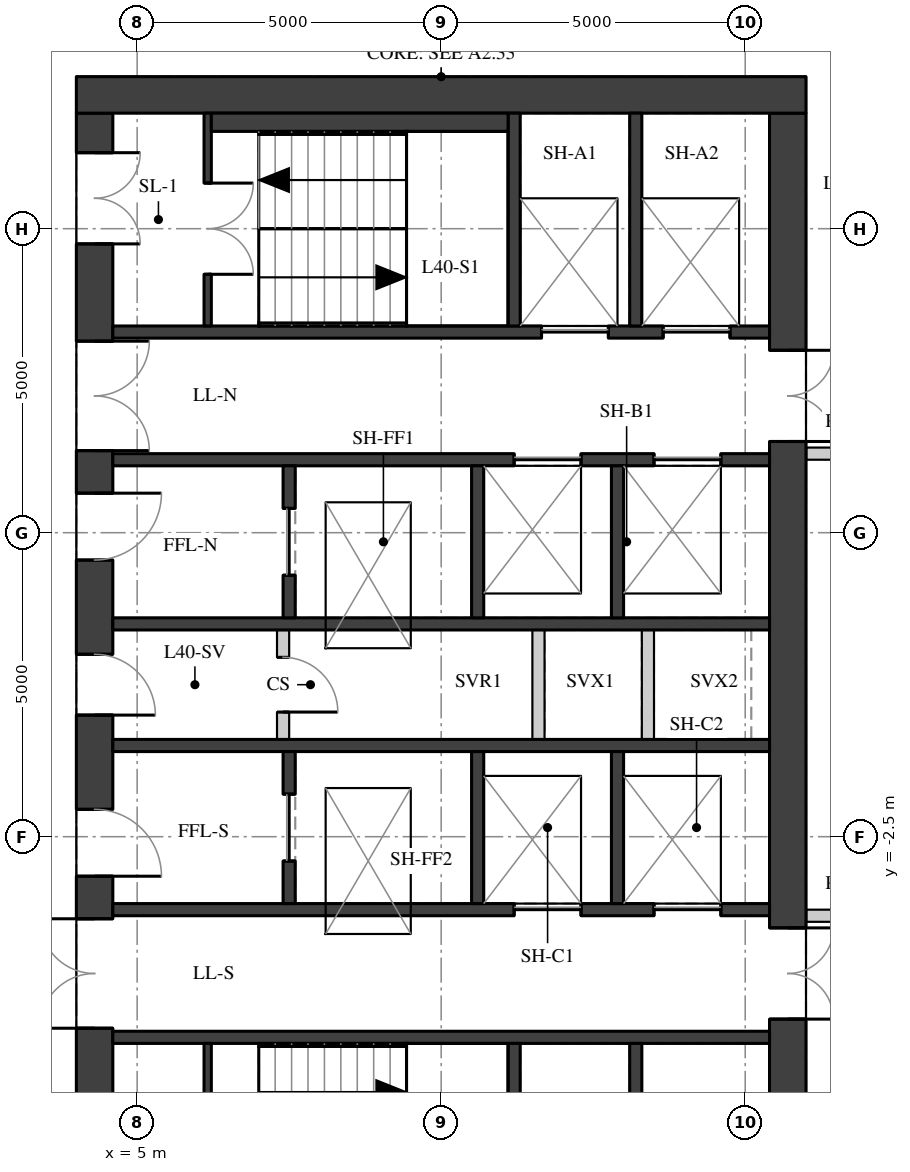
"""IFC4 building model, lengths in metres.
Left out: names, types, materials, properties, quantities, classifications, styles, units other than length and angle.
Written with IfcOpenShell. Run it as: python <this file> out.ifc"""

import sys

from ifc_helpers import new_model, si_unit, direction, frame, frame_2d, origin, place, context, subcontext, project, spatial, rectangle, extrude, element, fill, save


model = new_model("IFC4")
c1 = context("Model", 3, precision=1e-05, world=origin(), true_north=direction((0.0, 1.0)))
c2 = subcontext(c1, "Body", "Model", "MODEL_VIEW")
j1 = project(units=[si_unit("LENGTHUNIT", "METRE"), si_unit("PLANEANGLEUNIT", "RADIAN")], contexts=[c1])
p1 = place(None, origin())
s1 = spatial("IfcSite", under=j1, at=p1, CompositionType="ELEMENT")
p2 = place(p1, origin())
s2 = spatial("IfcBuilding", under=s1, at=p2, CompositionType="ELEMENT")
p3 = place(p2, frame((0.0, 0.0, 145.1)))
s3 = spatial("IfcBuildingStorey", under=s2, at=p3, CompositionType="ELEMENT", Elevation=145.1)
p4 = place(p3, frame((4.3, -9.4, 0.0), z_axis=(0.0, 0.0, 1.0), x_axis=(0.0, 1.0, 0.0)))
e1 = element("IfcWall", 1, at=p4, inside=s3, PredefinedType="SHEAR", context=c2, shape_type="SweptSolid", body=[
    extrude(rectangle(XDim=18.8, YDim=0.6, at=frame_2d((9.4, 0.0))), origin(), (0.0, 0.0, 1.0), 3.02),
])
p5 = place(p4, frame((0.65, 0.0, 0.0)))
e2 = element("IfcOpeningElement", 2, at=p5, cuts=e1, PredefinedType="OPENING", context=c2, shape_type="SweptSolid", body=[
    extrude(rectangle(XDim=1.5, YDim=2.1, at=frame_2d((0.75, 1.05))), frame((0.0, 0.31, 0.0), z_axis=(0.0, -1.0, 0.0), x_axis=(1.0, 0.0, 0.0)), (0.0, 0.0, 1.0), 0.62),
])
p6 = place(p4, frame((3.75, 0.0, 0.0)))
e3 = element("IfcOpeningElement", 3, at=p6, cuts=e1, PredefinedType="OPENING", context=c2, shape_type="SweptSolid", body=[
    extrude(rectangle(XDim=1.8, YDim=2.1, at=frame_2d((0.9, 1.05))), frame((0.0, 0.31, 0.0), z_axis=(0.0, -1.0, 0.0), x_axis=(1.0, 0.0, 0.0)), (0.0, 0.0, 1.0), 0.62),
])
p7 = place(p4, frame((6.25, 0.0, 0.0)))
e4 = element("IfcOpeningElement", 4, at=p7, cuts=e1, PredefinedType="OPENING", context=c2, shape_type="SweptSolid", body=[
    extrude(rectangle(XDim=1.1, YDim=2.1, at=frame_2d((0.55, 1.05))), frame((0.0, 0.31, 0.0), z_axis=(0.0, -1.0, 0.0), x_axis=(1.0, 0.0, 0.0)), (0.0, 0.0, 1.0), 0.62),
])
p8 = place(p4, frame((8.9, 0.0, 0.0)))
e5 = element("IfcOpeningElement", 5, at=p8, cuts=e1, PredefinedType="OPENING", context=c2, shape_type="SweptSolid", body=[
    extrude(rectangle(XDim=1.0, YDim=2.1, at=frame_2d((0.5, 1.05))), frame((0.0, 0.31, 0.0), z_axis=(0.0, -1.0, 0.0), x_axis=(1.0, 0.0, 0.0)), (0.0, 0.0, 1.0), 0.62),
])
p9 = place(p4, frame((11.45, 0.0, 0.0)))
e6 = element("IfcOpeningElement", 6, at=p9, cuts=e1, PredefinedType="OPENING", context=c2, shape_type="SweptSolid", body=[
    extrude(rectangle(XDim=1.1, YDim=2.1, at=frame_2d((0.55, 1.05))), frame((0.0, 0.31, 0.0), z_axis=(0.0, -1.0, 0.0), x_axis=(1.0, 0.0, 0.0)), (0.0, 0.0, 1.0), 0.62),
])
p10 = place(p4, frame((13.25, 0.0, 0.0)))
e7 = element("IfcOpeningElement", 7, at=p10, cuts=e1, PredefinedType="OPENING", context=c2, shape_type="SweptSolid", body=[
    extrude(rectangle(XDim=1.8, YDim=2.1, at=frame_2d((0.9, 1.05))), frame((0.0, 0.31, 0.0), z_axis=(0.0, -1.0, 0.0), x_axis=(1.0, 0.0, 0.0)), (0.0, 0.0, 1.0), 0.62),
])
p11 = place(p4, frame((16.65, 0.0, 0.0)))
e8 = element("IfcOpeningElement", 8, at=p11, cuts=e1, PredefinedType="OPENING", context=c2, shape_type="SweptSolid", body=[
    extrude(rectangle(XDim=1.5, YDim=2.1, at=frame_2d((0.75, 1.05))), frame((0.0, 0.31, 0.0), z_axis=(0.0, -1.0, 0.0), x_axis=(1.0, 0.0, 0.0)), (0.0, 0.0, 1.0), 0.62),
])
p12 = place(p3, frame((15.7, -9.4, 0.0), z_axis=(0.0, 0.0, 1.0), x_axis=(0.0, 1.0, 0.0)))
e9 = element("IfcWall", 9, at=p12, inside=s3, PredefinedType="SHEAR", context=c2, shape_type="SweptSolid", body=[
    extrude(rectangle(XDim=18.8, YDim=0.6, at=frame_2d((9.4, 0.0))), origin(), (0.0, 0.0, 1.0), 3.02),
])
p13 = place(p12, frame((13.4, 0.0, 0.0)))
e10 = element("IfcOpeningElement", 10, at=p13, cuts=e9, PredefinedType="OPENING", context=c2, shape_type="SweptSolid", body=[
    extrude(rectangle(XDim=1.5, YDim=2.1, at=frame_2d((0.75, 1.05))), frame((0.0, 0.31, 0.0), z_axis=(0.0, -1.0, 0.0), x_axis=(1.0, 0.0, 0.0)), (0.0, 0.0, 1.0), 0.62),
])
p14 = place(p12, frame((3.9, 0.0, 0.0)))
e11 = element("IfcOpeningElement", 11, at=p14, cuts=e9, PredefinedType="OPENING", context=c2, shape_type="SweptSolid", body=[
    extrude(rectangle(XDim=1.5, YDim=2.1, at=frame_2d((0.75, 1.05))), frame((0.0, 0.31, 0.0), z_axis=(0.0, -1.0, 0.0), x_axis=(1.0, 0.0, 0.0)), (0.0, 0.0, 1.0), 0.62),
])
p15 = place(p3, frame((4.0, 9.7, 0.0), z_axis=(0.0, 0.0, 1.0), x_axis=(1.0, 0.0, 0.0)))
e12 = element("IfcWall", 12, at=p15, inside=s3, PredefinedType="SHEAR", context=c2, shape_type="SweptSolid", body=[
    extrude(rectangle(XDim=12.0, YDim=0.6, at=frame_2d((6.0, 0.0))), origin(), (0.0, 0.0, 1.0), 3.02),
])
p16 = place(p3, frame((4.6, 5.8, 0.0), z_axis=(0.0, 0.0, 1.0), x_axis=(1.0, 0.0, 0.0)))
e13 = element("IfcWall", 13, at=p16, inside=s3, PredefinedType="SHEAR", context=c2, shape_type="SweptSolid", body=[
    extrude(rectangle(XDim=10.8, YDim=0.2, at=frame_2d((5.4, 0.0))), origin(), (0.0, 0.0, 1.0), 3.02),
])
p17 = place(p16, frame((7.05, 0.0, 0.0)))
e14 = element("IfcOpeningElement", 14, at=p17, cuts=e13, PredefinedType="OPENING", context=c2, shape_type="SweptSolid", body=[
    extrude(rectangle(XDim=1.1, YDim=2.1, at=frame_2d((0.55, 1.05))), frame((0.0, 0.11, 0.0), z_axis=(0.0, -1.0, 0.0), x_axis=(1.0, 0.0, 0.0)), (0.0, 0.0, 1.0), 0.22),
])
p18 = place(p16, frame((9.05, 0.0, 0.0)))
e15 = element("IfcOpeningElement", 15, at=p18, cuts=e13, PredefinedType="OPENING", context=c2, shape_type="SweptSolid", body=[
    extrude(rectangle(XDim=1.1, YDim=2.1, at=frame_2d((0.55, 1.05))), frame((0.0, 0.11, 0.0), z_axis=(0.0, -1.0, 0.0), x_axis=(1.0, 0.0, 0.0)), (0.0, 0.0, 1.0), 0.22),
])
p19 = place(p3, frame((4.6, 3.7, 0.0), z_axis=(0.0, 0.0, 1.0), x_axis=(1.0, 0.0, 0.0)))
e16 = element("IfcWall", 16, at=p19, inside=s3, PredefinedType="SHEAR", context=c2, shape_type="SweptSolid", body=[
    extrude(rectangle(XDim=10.8, YDim=0.2, at=frame_2d((5.4, 0.0))), origin(), (0.0, 0.0, 1.0), 3.02),
])
p20 = place(p19, frame((6.6, 0.0, 0.0)))
e17 = element("IfcOpeningElement", 17, at=p20, cuts=e16, PredefinedType="OPENING", context=c2, shape_type="SweptSolid", body=[
    extrude(rectangle(XDim=1.1, YDim=2.1, at=frame_2d((0.55, 1.05))), frame((0.0, 0.11, 0.0), z_axis=(0.0, -1.0, 0.0), x_axis=(1.0, 0.0, 0.0)), (0.0, 0.0, 1.0), 0.22),
])
p21 = place(p19, frame((8.9, 0.0, 0.0)))
e18 = element("IfcOpeningElement", 18, at=p21, cuts=e16, PredefinedType="OPENING", context=c2, shape_type="SweptSolid", body=[
    extrude(rectangle(XDim=1.1, YDim=2.1, at=frame_2d((0.55, 1.05))), frame((0.0, 0.11, 0.0), z_axis=(0.0, -1.0, 0.0), x_axis=(1.0, 0.0, 0.0)), (0.0, 0.0, 1.0), 0.22),
])
for number, where, z_axis, x_axis in (
    (19, (4.6, 1.0, 0.0), (0.0, 0.0, 1.0), (1.0, 0.0, 0.0)),
    (20, (4.6, -1.0, 0.0), (0.0, 0.0, 1.0), (1.0, 0.0, 0.0)),
):
    element("IfcWall", number, at=place(p3, frame(where, z_axis=z_axis, x_axis=x_axis)), inside=s3, PredefinedType="SHEAR", context=c2, shape_type="SweptSolid", body=[
        extrude(rectangle(XDim=10.8, YDim=0.2, at=frame_2d((5.4, 0.0))), origin(), (0.0, 0.0, 1.0), 3.02),
    ])
p22 = place(p3, frame((4.6, -3.7, 0.0), z_axis=(0.0, 0.0, 1.0), x_axis=(1.0, 0.0, 0.0)))
e21 = element("IfcWall", 21, at=p22, inside=s3, PredefinedType="SHEAR", context=c2, shape_type="SweptSolid", body=[
    extrude(rectangle(XDim=10.8, YDim=0.2, at=frame_2d((5.4, 0.0))), origin(), (0.0, 0.0, 1.0), 3.02),
])
p23 = place(p22, frame((6.6, 0.0, 0.0)))
e22 = element("IfcOpeningElement", 22, at=p23, cuts=e21, PredefinedType="OPENING", context=c2, shape_type="SweptSolid", body=[
    extrude(rectangle(XDim=1.1, YDim=2.1, at=frame_2d((0.55, 1.05))), frame((0.0, 0.11, 0.0), z_axis=(0.0, -1.0, 0.0), x_axis=(1.0, 0.0, 0.0)), (0.0, 0.0, 1.0), 0.22),
])
p24 = place(p22, frame((8.9, 0.0, 0.0)))
e23 = element("IfcOpeningElement", 23, at=p24, cuts=e21, PredefinedType="OPENING", context=c2, shape_type="SweptSolid", body=[
    extrude(rectangle(XDim=1.1, YDim=2.1, at=frame_2d((0.55, 1.05))), frame((0.0, 0.11, 0.0), z_axis=(0.0, -1.0, 0.0), x_axis=(1.0, 0.0, 0.0)), (0.0, 0.0, 1.0), 0.22),
])
p25 = place(p3, frame((4.6, -5.8, 0.0), z_axis=(0.0, 0.0, 1.0), x_axis=(1.0, 0.0, 0.0)))
e24 = element("IfcWall", 24, at=p25, inside=s3, PredefinedType="SHEAR", context=c2, shape_type="SweptSolid", body=[
    extrude(rectangle(XDim=10.8, YDim=0.2, at=frame_2d((5.4, 0.0))), origin(), (0.0, 0.0, 1.0), 3.02),
])
for number, where, z_axis, x_axis in (
    (25, (11.2, 5.9, 0.0), (0.0, 0.0, 1.0), (0.0, 1.0, 0.0)),
    (26, (11.2, -9.4, 0.0), (0.0, 0.0, 1.0), (0.0, 1.0, 0.0)),
    (27, (13.2, 5.9, 0.0), (0.0, 0.0, 1.0), (0.0, 1.0, 0.0)),
    (28, (13.2, -9.4, 0.0), (0.0, 0.0, 1.0), (0.0, 1.0, 0.0)),
):
    element("IfcWall", number, at=place(p3, frame(where, z_axis=z_axis, x_axis=x_axis)), inside=s3, PredefinedType="SHEAR", context=c2, shape_type="SweptSolid", body=[
        extrude(rectangle(XDim=3.5, YDim=0.2, at=frame_2d((1.75, 0.0))), origin(), (0.0, 0.0, 1.0), 3.02),
    ])
p26 = place(p3, frame((7.5, 1.1, 0.0), z_axis=(0.0, 0.0, 1.0), x_axis=(0.0, 1.0, 0.0)))
e29 = element("IfcWall", 29, at=p26, inside=s3, PredefinedType="SHEAR", context=c2, shape_type="SweptSolid", body=[
    extrude(rectangle(XDim=2.5, YDim=0.2, at=frame_2d((1.25, 0.0))), origin(), (0.0, 0.0, 1.0), 3.02),
])
p27 = place(p26, frame((0.7, 0.0, 0.0)))
e30 = element("IfcOpeningElement", 30, at=p27, cuts=e29, PredefinedType="OPENING", context=c2, shape_type="SweptSolid", body=[
    extrude(rectangle(XDim=1.1, YDim=2.1, at=frame_2d((0.55, 1.05))), frame((0.0, 0.11, 0.0), z_axis=(0.0, -1.0, 0.0), x_axis=(1.0, 0.0, 0.0)), (0.0, 0.0, 1.0), 0.22),
])
p28 = place(p3, frame((7.5, -3.6, 0.0), z_axis=(0.0, 0.0, 1.0), x_axis=(0.0, 1.0, 0.0)))
e31 = element("IfcWall", 31, at=p28, inside=s3, PredefinedType="SHEAR", context=c2, shape_type="SweptSolid", body=[
    extrude(rectangle(XDim=2.5, YDim=0.2, at=frame_2d((1.25, 0.0))), origin(), (0.0, 0.0, 1.0), 3.02),
])
p29 = place(p28, frame((0.7, 0.0, 0.0)))
e32 = element("IfcOpeningElement", 32, at=p29, cuts=e31, PredefinedType="OPENING", context=c2, shape_type="SweptSolid", body=[
    extrude(rectangle(XDim=1.1, YDim=2.1, at=frame_2d((0.55, 1.05))), frame((0.0, 0.11, 0.0), z_axis=(0.0, -1.0, 0.0), x_axis=(1.0, 0.0, 0.0)), (0.0, 0.0, 1.0), 0.22),
])
for number, where, z_axis, x_axis in (
    (33, (10.6, 1.1, 0.0), (0.0, 0.0, 1.0), (0.0, 1.0, 0.0)),
    (34, (10.6, -3.6, 0.0), (0.0, 0.0, 1.0), (0.0, 1.0, 0.0)),
    (35, (12.9, 1.1, 0.0), (0.0, 0.0, 1.0), (0.0, 1.0, 0.0)),
    (36, (12.9, -3.6, 0.0), (0.0, 0.0, 1.0), (0.0, 1.0, 0.0)),
):
    element("IfcWall", number, at=place(p3, frame(where, z_axis=z_axis, x_axis=x_axis)), inside=s3, PredefinedType="SHEAR", context=c2, shape_type="SweptSolid", body=[
        extrude(rectangle(XDim=2.5, YDim=0.2, at=frame_2d((1.25, 0.0))), origin(), (0.0, 0.0, 1.0), 3.02),
    ])
p30 = place(p3, frame((6.16, 5.9, 0.0), z_axis=(0.0, 0.0, 1.0), x_axis=(0.0, 1.0, 0.0)))
e37 = element("IfcWall", 37, at=p30, inside=s3, PredefinedType="SHEAR", context=c2, shape_type="SweptSolid", body=[
    extrude(rectangle(XDim=3.5, YDim=0.12, at=frame_2d((1.75, 0.0))), origin(), (0.0, 0.0, 1.0), 3.02),
])
p31 = place(p30, frame((0.85, 0.0, 0.0)))
e38 = element("IfcOpeningElement", 38, at=p31, cuts=e37, PredefinedType="OPENING", context=c2, shape_type="SweptSolid", body=[
    extrude(rectangle(XDim=1.5, YDim=2.1, at=frame_2d((0.75, 1.05))), frame((0.0, 0.07, 0.0), z_axis=(0.0, -1.0, 0.0), x_axis=(1.0, 0.0, 0.0)), (0.0, 0.0, 1.0), 0.14),
])
p32 = place(p3, frame((6.16, -9.4, 0.0), z_axis=(0.0, 0.0, 1.0), x_axis=(0.0, 1.0, 0.0)))
e39 = element("IfcWall", 39, at=p32, inside=s3, PredefinedType="SHEAR", context=c2, shape_type="SweptSolid", body=[
    extrude(rectangle(XDim=3.5, YDim=0.12, at=frame_2d((1.75, 0.0))), origin(), (0.0, 0.0, 1.0), 3.02),
])
p33 = place(p32, frame((1.15, 0.0, 0.0)))
e40 = element("IfcOpeningElement", 40, at=p33, cuts=e39, PredefinedType="OPENING", context=c2, shape_type="SweptSolid", body=[
    extrude(rectangle(XDim=1.5, YDim=2.1, at=frame_2d((0.75, 1.05))), frame((0.0, 0.07, 0.0), z_axis=(0.0, -1.0, 0.0), x_axis=(1.0, 0.0, 0.0)), (0.0, 0.0, 1.0), 0.14),
])
p34 = place(p3, frame((7.4, -0.9, 0.0), z_axis=(0.0, 0.0, 1.0), x_axis=(0.0, 1.0, 0.0)))
e41 = element("IfcWall", 41, at=p34, inside=s3, PredefinedType="PARTITIONING", context=c2, shape_type="SweptSolid", body=[
    extrude(rectangle(XDim=1.8, YDim=0.2, at=frame_2d((0.9, 0.0))), origin(), (0.0, 0.0, 1.0), 3.02),
])
p35 = place(p34, frame((0.45, 0.0, 0.0)))
e42 = element("IfcOpeningElement", 42, at=p35, cuts=e41, PredefinedType="OPENING", context=c2, shape_type="SweptSolid", body=[
    extrude(rectangle(XDim=0.9, YDim=2.1, at=frame_2d((0.45, 1.05))), frame((0.0, 0.11, 0.0), z_axis=(0.0, -1.0, 0.0), x_axis=(1.0, 0.0, 0.0)), (0.0, 0.0, 1.0), 0.22),
])
for number, where, z_axis, x_axis in (
    (43, (11.6, -0.9, 0.0), (0.0, 0.0, 1.0), (0.0, 1.0, 0.0)),
    (44, (13.4, -0.9, 0.0), (0.0, 0.0, 1.0), (0.0, 1.0, 0.0)),
):
    element("IfcWall", number, at=place(p3, frame(where, z_axis=z_axis, x_axis=x_axis)), inside=s3, PredefinedType="PARTITIONING", context=c2, shape_type="SweptSolid", body=[
        extrude(rectangle(XDim=1.8, YDim=0.2, at=frame_2d((0.9, 0.0))), origin(), (0.0, 0.0, 1.0), 3.02),
    ])
p36 = place(p3, frame((6.22, 9.25, 0.0), z_axis=(0.0, 0.0, 1.0), x_axis=(1.0, 0.0, 0.0)))
e45 = element("IfcWall", 45, at=p36, inside=s3, PredefinedType="PARTITIONING", context=c2, shape_type="SweptSolid", body=[
    extrude(rectangle(XDim=4.88, YDim=0.3, at=frame_2d((2.44, 0.0))), origin(), (0.0, 0.0, 1.0), 3.02),
])
for number, where, z_axis, x_axis in (
    (46, (17.5, 3.8, 0.0), (0.0, 0.0, 1.0), (-1.0, 0.0, 0.0)),
    (47, (16.004, -3.8, 0.0), (0.0, 0.0, 1.0), (1.0, 0.0, 0.0)),
):
    element("IfcWall", number, at=place(p3, frame(where, z_axis=z_axis, x_axis=x_axis)), inside=s3, PredefinedType="PARTITIONING", context=c2, shape_type="SweptSolid", body=[
        extrude(rectangle(XDim=1.496, YDim=0.2, at=frame_2d((0.748, 0.0))), origin(), (0.0, 0.0, 1.0), 2.57),
    ])
p37 = place(p6, origin())
e48 = element("IfcDoor", 48, at=p37, inside=s3, OperationType="DOUBLE_DOOR_SINGLE_SWING", PredefinedType="DOOR", context=c2, shape_type="SweptSolid", body=[
    extrude(rectangle(XDim=1.8, YDim=2.1, at=frame_2d((0.9, 1.05))), frame((0.0, 0.025, 0.0), z_axis=(0.0, -1.0, 0.0), x_axis=(1.0, 0.0, 0.0)), (0.0, 0.0, 1.0), 0.05),
])
fill(e3, e48)
p38 = place(p7, origin())
e49 = element("IfcDoor", 49, at=p38, inside=s3, OperationType="SINGLE_SWING_RIGHT", PredefinedType="DOOR", context=c2, shape_type="SweptSolid", body=[
    extrude(rectangle(XDim=1.1, YDim=2.1, at=frame_2d((0.55, 1.05))), frame((0.0, 0.025, 0.0), z_axis=(0.0, -1.0, 0.0), x_axis=(1.0, 0.0, 0.0)), (0.0, 0.0, 1.0), 0.05),
])
fill(e4, e49)
p39 = place(p8, origin())
e50 = element("IfcDoor", 50, at=p39, inside=s3, OperationType="SINGLE_SWING_RIGHT", PredefinedType="DOOR", context=c2, shape_type="SweptSolid", body=[
    extrude(rectangle(XDim=1.0, YDim=2.1, at=frame_2d((0.5, 1.05))), frame((0.0, 0.025, 0.0), z_axis=(0.0, -1.0, 0.0), x_axis=(1.0, 0.0, 0.0)), (0.0, 0.0, 1.0), 0.05),
])
fill(e5, e50)
p40 = place(p9, origin())
e51 = element("IfcDoor", 51, at=p40, inside=s3, OperationType="SINGLE_SWING_LEFT", PredefinedType="DOOR", context=c2, shape_type="SweptSolid", body=[
    extrude(rectangle(XDim=1.1, YDim=2.1, at=frame_2d((0.55, 1.05))), frame((0.0, 0.025, 0.0), z_axis=(0.0, -1.0, 0.0), x_axis=(1.0, 0.0, 0.0)), (0.0, 0.0, 1.0), 0.05),
])
fill(e6, e51)
p41 = place(p10, origin())
e52 = element("IfcDoor", 52, at=p41, inside=s3, OperationType="DOUBLE_DOOR_SINGLE_SWING", PredefinedType="DOOR", context=c2, shape_type="SweptSolid", body=[
    extrude(rectangle(XDim=1.8, YDim=2.1, at=frame_2d((0.9, 1.05))), frame((0.0, 0.025, 0.0), z_axis=(0.0, -1.0, 0.0), x_axis=(1.0, 0.0, 0.0)), (0.0, 0.0, 1.0), 0.05),
])
fill(e7, e52)
p42 = place(p11, origin())
e53 = element("IfcDoor", 53, at=p42, inside=s3, OperationType="DOUBLE_DOOR_SINGLE_SWING", PredefinedType="DOOR", context=c2, shape_type="SweptSolid", body=[
    extrude(rectangle(XDim=1.5, YDim=2.1, at=frame_2d((0.75, 1.05))), frame((0.0, 0.025, 0.0), z_axis=(0.0, -1.0, 0.0), x_axis=(1.0, 0.0, 0.0)), (0.0, 0.0, 1.0), 0.05),
])
fill(e8, e53)
p43 = place(p13, origin())
e54 = element("IfcDoor", 54, at=p43, inside=s3, OperationType="DOUBLE_DOOR_SINGLE_SWING", PredefinedType="DOOR", context=c2, shape_type="SweptSolid", body=[
    extrude(rectangle(XDim=1.5, YDim=2.1, at=frame_2d((0.75, 1.05))), frame((0.0, 0.025, 0.0), z_axis=(0.0, -1.0, 0.0), x_axis=(1.0, 0.0, 0.0)), (0.0, 0.0, 1.0), 0.05),
])
fill(e10, e54)
p44 = place(p14, origin())
e55 = element("IfcDoor", 55, at=p44, inside=s3, OperationType="DOUBLE_DOOR_SINGLE_SWING", PredefinedType="DOOR", context=c2, shape_type="SweptSolid", body=[
    extrude(rectangle(XDim=1.5, YDim=2.1, at=frame_2d((0.75, 1.05))), frame((0.0, 0.025, 0.0), z_axis=(0.0, -1.0, 0.0), x_axis=(1.0, 0.0, 0.0)), (0.0, 0.0, 1.0), 0.05),
])
fill(e11, e55)
p45 = place(p31, origin())
e56 = element("IfcDoor", 56, at=p45, inside=s3, OperationType="DOUBLE_DOOR_SINGLE_SWING", PredefinedType="DOOR", context=c2, shape_type="SweptSolid", body=[
    extrude(rectangle(XDim=1.5, YDim=2.1, at=frame_2d((0.75, 1.05))), frame((0.0, 0.025, 0.0), z_axis=(0.0, -1.0, 0.0), x_axis=(1.0, 0.0, 0.0)), (0.0, 0.0, 1.0), 0.05),
])
fill(e38, e56)
p46 = place(p17, origin())
e57 = element("IfcDoor", 57, at=p46, inside=s3, OperationType="DOUBLE_DOOR_SLIDING", PredefinedType="DOOR", context=c2, shape_type="SweptSolid", body=[
    extrude(rectangle(XDim=1.1, YDim=2.1, at=frame_2d((0.55, 1.05))), frame((0.0, 0.025, 0.0), z_axis=(0.0, -1.0, 0.0), x_axis=(1.0, 0.0, 0.0)), (0.0, 0.0, 1.0), 0.05),
])
fill(e14, e57)
p47 = place(p18, origin())
e58 = element("IfcDoor", 58, at=p47, inside=s3, OperationType="DOUBLE_DOOR_SLIDING", PredefinedType="DOOR", context=c2, shape_type="SweptSolid", body=[
    extrude(rectangle(XDim=1.1, YDim=2.1, at=frame_2d((0.55, 1.05))), frame((0.0, 0.025, 0.0), z_axis=(0.0, -1.0, 0.0), x_axis=(1.0, 0.0, 0.0)), (0.0, 0.0, 1.0), 0.05),
])
fill(e15, e58)
p48 = place(p20, origin())
e59 = element("IfcDoor", 59, at=p48, inside=s3, OperationType="DOUBLE_DOOR_SLIDING", PredefinedType="DOOR", context=c2, shape_type="SweptSolid", body=[
    extrude(rectangle(XDim=1.1, YDim=2.1, at=frame_2d((0.55, 1.05))), frame((0.0, 0.025, 0.0), z_axis=(0.0, -1.0, 0.0), x_axis=(1.0, 0.0, 0.0)), (0.0, 0.0, 1.0), 0.05),
])
fill(e17, e59)
p49 = place(p21, origin())
e60 = element("IfcDoor", 60, at=p49, inside=s3, OperationType="DOUBLE_DOOR_SLIDING", PredefinedType="DOOR", context=c2, shape_type="SweptSolid", body=[
    extrude(rectangle(XDim=1.1, YDim=2.1, at=frame_2d((0.55, 1.05))), frame((0.0, 0.025, 0.0), z_axis=(0.0, -1.0, 0.0), x_axis=(1.0, 0.0, 0.0)), (0.0, 0.0, 1.0), 0.05),
])
fill(e18, e60)
p50 = place(p23, origin())
e61 = element("IfcDoor", 61, at=p50, inside=s3, OperationType="DOUBLE_DOOR_SLIDING", PredefinedType="DOOR", context=c2, shape_type="SweptSolid", body=[
    extrude(rectangle(XDim=1.1, YDim=2.1, at=frame_2d((0.55, 1.05))), frame((0.0, 0.025, 0.0), z_axis=(0.0, -1.0, 0.0), x_axis=(1.0, 0.0, 0.0)), (0.0, 0.0, 1.0), 0.05),
])
fill(e22, e61)
p51 = place(p24, origin())
e62 = element("IfcDoor", 62, at=p51, inside=s3, OperationType="DOUBLE_DOOR_SLIDING", PredefinedType="DOOR", context=c2, shape_type="SweptSolid", body=[
    extrude(rectangle(XDim=1.1, YDim=2.1, at=frame_2d((0.55, 1.05))), frame((0.0, 0.025, 0.0), z_axis=(0.0, -1.0, 0.0), x_axis=(1.0, 0.0, 0.0)), (0.0, 0.0, 1.0), 0.05),
])
fill(e23, e62)
p52 = place(p27, origin())
e63 = element("IfcDoor", 63, at=p52, inside=s3, OperationType="DOUBLE_DOOR_SLIDING", PredefinedType="DOOR", context=c2, shape_type="SweptSolid", body=[
    extrude(rectangle(XDim=1.1, YDim=2.1, at=frame_2d((0.55, 1.05))), frame((0.0, 0.025, 0.0), z_axis=(0.0, -1.0, 0.0), x_axis=(1.0, 0.0, 0.0)), (0.0, 0.0, 1.0), 0.05),
])
fill(e30, e63)
p53 = place(p29, origin())
e64 = element("IfcDoor", 64, at=p53, inside=s3, OperationType="DOUBLE_DOOR_SLIDING", PredefinedType="DOOR", context=c2, shape_type="SweptSolid", body=[
    extrude(rectangle(XDim=1.1, YDim=2.1, at=frame_2d((0.55, 1.05))), frame((0.0, 0.025, 0.0), z_axis=(0.0, -1.0, 0.0), x_axis=(1.0, 0.0, 0.0)), (0.0, 0.0, 1.0), 0.05),
])
fill(e32, e64)
p54 = place(p35, origin())
e65 = element("IfcDoor", 65, at=p54, inside=s3, OperationType="SINGLE_SWING_RIGHT", PredefinedType="DOOR", context=c2, shape_type="SweptSolid", body=[
    extrude(rectangle(XDim=0.9, YDim=2.1, at=frame_2d((0.45, 1.05))), frame((0.0, 0.025, 0.0), z_axis=(0.0, -1.0, 0.0), x_axis=(1.0, 0.0, 0.0)), (0.0, 0.0, 1.0), 0.05),
])
fill(e42, e65)
save(model, sys.argv[1])
